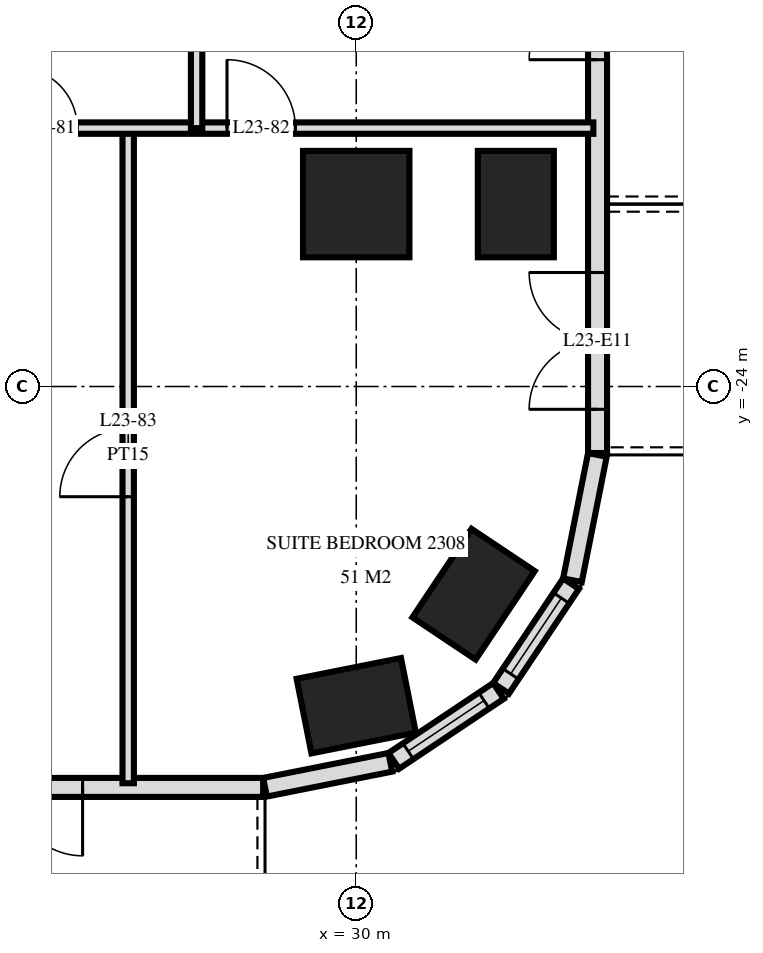
"""IFC4 building model, lengths in metres.
Left out: names, types, materials, properties, quantities, classifications, styles, units other than length and angle.
Written with IfcOpenShell. Run it as: python <this file> out.ifc"""

import sys

from ifc_helpers import new_model, si_unit, direction, frame, frame_2d, origin, origin_2d, place, context, subcontext, project, spatial, rectangle, extrude, element, fill, save


model = new_model("IFC4")
c1 = context("Model", 3, precision=1e-05, world=origin(), true_north=direction((0.0, 1.0)))
c2 = subcontext(c1, "Body", "Model", "MODEL_VIEW")
j1 = project(units=[si_unit("LENGTHUNIT", "METRE"), si_unit("PLANEANGLEUNIT", "RADIAN")], contexts=[c1])
p1 = place(None, origin())
s1 = spatial("IfcSite", under=j1, at=p1, CompositionType="ELEMENT")
p2 = place(p1, origin())
s2 = spatial("IfcBuilding", under=s1, at=p2, CompositionType="ELEMENT")
p3 = place(p2, frame((0.0, 0.0, 92.4)))
s3 = spatial("IfcBuildingStorey", under=s2, at=p3, CompositionType="ELEMENT", Elevation=92.4)
p4 = place(p3, frame((30.0, -28.2, 0.0), z_axis=(0.0, 0.0, 1.0), x_axis=(0.980792089743, 0.195056086032, 0.0)))
e1 = element("IfcColumn", 1, at=p4, inside=s3, PredefinedType="COLUMN", context=c2, shape_type="SweptSolid", body=[
    extrude(rectangle(XDim=1.4, YDim=1.0, at=origin_2d()), origin(), (0.0, 0.0, 1.0), 3.6),
])
p5 = place(p3, frame((30.0, -21.6, 0.0), z_axis=(0.0, 0.0, 1.0), x_axis=(1.0, 0.0, 0.0)))
e2 = element("IfcColumn", 2, at=p5, inside=s3, PredefinedType="COLUMN", context=c2, shape_type="SweptSolid", body=[
    extrude(rectangle(XDim=1.4, YDim=1.4, at=origin_2d()), origin(), (0.0, 0.0, 1.0), 3.6),
])
for number, where, z_axis, x_axis in (
    (3, (31.544, -26.733, 0.0), (0.0, 0.0, 1.0), (0.556, 0.831, 0.0)),
    (4, (32.1, -21.6, 0.0), (0.0, 0.0, 1.0), (0.0, 1.0, 0.0)),
):
    element("IfcColumn", number, at=place(p3, frame(where, z_axis=z_axis, x_axis=x_axis)), inside=s3, PredefinedType="COLUMN", context=c2, shape_type="SweptSolid", body=[
        extrude(rectangle(XDim=1.4, YDim=1.0, at=origin_2d()), origin(), (0.0, 0.0, 1.0), 3.6),
    ])
p6 = place(p3, frame((-28.775, -29.275, 0.0), z_axis=(0.0, 0.0, 1.0), x_axis=(1.0, 0.0, 0.0)))
e5 = element("IfcWall", 5, at=p6, inside=s3, PredefinedType="SOLIDWALL", context=c2, shape_type="SweptSolid", body=[
    extrude(rectangle(XDim=57.551, YDim=0.25, at=frame_2d((28.775, 0.0))), origin(), (0.0, 0.0, 1.0), 3.32),
])
p7 = place(p6, frame((0.575, 0.0, 0.0)))
e6 = element("IfcOpeningElement", 6, at=p7, cuts=e5, PredefinedType="OPENING", context=c2, shape_type="SweptSolid", body=[
    extrude(rectangle(XDim=1.8, YDim=2.4, at=frame_2d((0.9, 1.2))), frame((0.0, 0.135, 0.0), z_axis=(0.0, -1.0, 0.0), x_axis=(1.0, 0.0, 0.0)), (0.0, 0.0, 1.0), 0.27),
])
p8 = place(p6, frame((5.075, 0.0, 0.3)))
e7 = element("IfcOpeningElement", 7, at=p8, cuts=e5, PredefinedType="OPENING", context=c2, shape_type="SweptSolid", body=[
    extrude(rectangle(XDim=2.4, YDim=2.1, at=frame_2d((1.2, 1.05))), frame((0.0, 0.135, 0.0), z_axis=(0.0, -1.0, 0.0), x_axis=(1.0, 0.0, 0.0)), (0.0, 0.0, 1.0), 0.27),
])
p9 = place(p6, frame((8.375, 0.0, 0.0)))
e8 = element("IfcOpeningElement", 8, at=p9, cuts=e5, PredefinedType="OPENING", context=c2, shape_type="SweptSolid", body=[
    extrude(rectangle(XDim=1.8, YDim=2.4, at=frame_2d((0.9, 1.2))), frame((0.0, 0.135, 0.0), z_axis=(0.0, -1.0, 0.0), x_axis=(1.0, 0.0, 0.0)), (0.0, 0.0, 1.0), 0.27),
])
p10 = place(p6, frame((11.375, 0.0, 0.0)))
e9 = element("IfcOpeningElement", 9, at=p10, cuts=e5, PredefinedType="OPENING", context=c2, shape_type="SweptSolid", body=[
    extrude(rectangle(XDim=1.8, YDim=2.4, at=frame_2d((0.9, 1.2))), frame((0.0, 0.135, 0.0), z_axis=(0.0, -1.0, 0.0), x_axis=(1.0, 0.0, 0.0)), (0.0, 0.0, 1.0), 0.27),
])
p11 = place(p6, frame((14.075, 0.0, 0.3)))
e10 = element("IfcOpeningElement", 10, at=p11, cuts=e5, PredefinedType="OPENING", context=c2, shape_type="SweptSolid", body=[
    extrude(rectangle(XDim=2.4, YDim=2.1, at=frame_2d((1.2, 1.05))), frame((0.0, 0.135, 0.0), z_axis=(0.0, -1.0, 0.0), x_axis=(1.0, 0.0, 0.0)), (0.0, 0.0, 1.0), 0.27),
])
p12 = place(p6, frame((17.375, 0.0, 0.0)))
e11 = element("IfcOpeningElement", 11, at=p12, cuts=e5, PredefinedType="OPENING", context=c2, shape_type="SweptSolid", body=[
    extrude(rectangle(XDim=1.8, YDim=2.4, at=frame_2d((0.9, 1.2))), frame((0.0, 0.135, 0.0), z_axis=(0.0, -1.0, 0.0), x_axis=(1.0, 0.0, 0.0)), (0.0, 0.0, 1.0), 0.27),
])
p13 = place(p6, frame((20.075, 0.0, 0.3)))
e12 = element("IfcOpeningElement", 12, at=p13, cuts=e5, PredefinedType="OPENING", context=c2, shape_type="SweptSolid", body=[
    extrude(rectangle(XDim=2.4, YDim=2.1, at=frame_2d((1.2, 1.05))), frame((0.0, 0.135, 0.0), z_axis=(0.0, -1.0, 0.0), x_axis=(1.0, 0.0, 0.0)), (0.0, 0.0, 1.0), 0.27),
])
p14 = place(p6, frame((23.075, 0.0, 0.3)))
e13 = element("IfcOpeningElement", 13, at=p14, cuts=e5, PredefinedType="OPENING", context=c2, shape_type="SweptSolid", body=[
    extrude(rectangle(XDim=2.4, YDim=2.1, at=frame_2d((1.2, 1.05))), frame((0.0, 0.135, 0.0), z_axis=(0.0, -1.0, 0.0), x_axis=(1.0, 0.0, 0.0)), (0.0, 0.0, 1.0), 0.27),
])
p15 = place(p6, frame((26.375, 0.0, 0.0)))
e14 = element("IfcOpeningElement", 14, at=p15, cuts=e5, PredefinedType="OPENING", context=c2, shape_type="SweptSolid", body=[
    extrude(rectangle(XDim=1.8, YDim=2.4, at=frame_2d((0.9, 1.2))), frame((0.0, 0.135, 0.0), z_axis=(0.0, -1.0, 0.0), x_axis=(1.0, 0.0, 0.0)), (0.0, 0.0, 1.0), 0.27),
])
p16 = place(p6, frame((29.375, 0.0, 0.0)))
e15 = element("IfcOpeningElement", 15, at=p16, cuts=e5, PredefinedType="OPENING", context=c2, shape_type="SweptSolid", body=[
    extrude(rectangle(XDim=1.8, YDim=2.4, at=frame_2d((0.9, 1.2))), frame((0.0, 0.135, 0.0), z_axis=(0.0, -1.0, 0.0), x_axis=(1.0, 0.0, 0.0)), (0.0, 0.0, 1.0), 0.27),
])
p17 = place(p6, frame((32.075, 0.0, 0.3)))
e16 = element("IfcOpeningElement", 16, at=p17, cuts=e5, PredefinedType="OPENING", context=c2, shape_type="SweptSolid", body=[
    extrude(rectangle(XDim=2.4, YDim=2.1, at=frame_2d((1.2, 1.05))), frame((0.0, 0.135, 0.0), z_axis=(0.0, -1.0, 0.0), x_axis=(1.0, 0.0, 0.0)), (0.0, 0.0, 1.0), 0.27),
])
p18 = place(p6, frame((35.375, 0.0, 0.0)))
e17 = element("IfcOpeningElement", 17, at=p18, cuts=e5, PredefinedType="OPENING", context=c2, shape_type="SweptSolid", body=[
    extrude(rectangle(XDim=1.8, YDim=2.4, at=frame_2d((0.9, 1.2))), frame((0.0, 0.135, 0.0), z_axis=(0.0, -1.0, 0.0), x_axis=(1.0, 0.0, 0.0)), (0.0, 0.0, 1.0), 0.27),
])
p19 = place(p6, frame((38.075, 0.0, 0.3)))
e18 = element("IfcOpeningElement", 18, at=p19, cuts=e5, PredefinedType="OPENING", context=c2, shape_type="SweptSolid", body=[
    extrude(rectangle(XDim=2.4, YDim=2.1, at=frame_2d((1.2, 1.05))), frame((0.0, 0.135, 0.0), z_axis=(0.0, -1.0, 0.0), x_axis=(1.0, 0.0, 0.0)), (0.0, 0.0, 1.0), 0.27),
])
p20 = place(p6, frame((41.075, 0.0, 0.3)))
e19 = element("IfcOpeningElement", 19, at=p20, cuts=e5, PredefinedType="OPENING", context=c2, shape_type="SweptSolid", body=[
    extrude(rectangle(XDim=2.4, YDim=2.1, at=frame_2d((1.2, 1.05))), frame((0.0, 0.135, 0.0), z_axis=(0.0, -1.0, 0.0), x_axis=(1.0, 0.0, 0.0)), (0.0, 0.0, 1.0), 0.27),
])
p21 = place(p6, frame((44.375, 0.0, 0.0)))
e20 = element("IfcOpeningElement", 20, at=p21, cuts=e5, PredefinedType="OPENING", context=c2, shape_type="SweptSolid", body=[
    extrude(rectangle(XDim=1.8, YDim=2.4, at=frame_2d((0.9, 1.2))), frame((0.0, 0.135, 0.0), z_axis=(0.0, -1.0, 0.0), x_axis=(1.0, 0.0, 0.0)), (0.0, 0.0, 1.0), 0.27),
])
p22 = place(p6, frame((47.075, 0.0, 0.3)))
e21 = element("IfcOpeningElement", 21, at=p22, cuts=e5, PredefinedType="OPENING", context=c2, shape_type="SweptSolid", body=[
    extrude(rectangle(XDim=2.4, YDim=2.1, at=frame_2d((1.2, 1.05))), frame((0.0, 0.135, 0.0), z_axis=(0.0, -1.0, 0.0), x_axis=(1.0, 0.0, 0.0)), (0.0, 0.0, 1.0), 0.27),
])
p23 = place(p6, frame((50.375, 0.0, 0.0)))
e22 = element("IfcOpeningElement", 22, at=p23, cuts=e5, PredefinedType="OPENING", context=c2, shape_type="SweptSolid", body=[
    extrude(rectangle(XDim=1.8, YDim=2.4, at=frame_2d((0.9, 1.2))), frame((0.0, 0.135, 0.0), z_axis=(0.0, -1.0, 0.0), x_axis=(1.0, 0.0, 0.0)), (0.0, 0.0, 1.0), 0.27),
])
p24 = place(p6, frame((53.375, 0.0, 0.0)))
e23 = element("IfcOpeningElement", 23, at=p24, cuts=e5, PredefinedType="OPENING", context=c2, shape_type="SweptSolid", body=[
    extrude(rectangle(XDim=1.8, YDim=2.4, at=frame_2d((0.9, 1.2))), frame((0.0, 0.135, 0.0), z_axis=(0.0, -1.0, 0.0), x_axis=(1.0, 0.0, 0.0)), (0.0, 0.0, 1.0), 0.27),
])
p25 = place(p3, frame((28.8, -29.273, 0.0), z_axis=(0.0, 0.0, 1.0), x_axis=(0.980775640221, 0.19513878023, 0.0)))
e24 = element("IfcWall", 24, at=p25, inside=s3, PredefinedType="SOLIDWALL", context=c2, shape_type="SweptSolid", body=[
    extrude(rectangle(XDim=1.681, YDim=0.25, at=frame_2d((0.841, 0.0))), origin(), (0.0, 0.0, 1.0), 3.32),
])
p26 = place(p3, frame((30.494, -28.926, 0.0), z_axis=(0.0, 0.0, 1.0), x_axis=(0.831482937015, 0.55555029066, 0.0)))
e25 = element("IfcWall", 25, at=p26, inside=s3, PredefinedType="SOLIDWALL", context=c2, shape_type="SweptSolid", body=[
    extrude(rectangle(XDim=1.656, YDim=0.25, at=frame_2d((0.828, 0.0))), origin(), (0.0, 0.0, 1.0), 3.32),
])
p27 = place(p26, frame((0.228, 0.0, 0.9)))
e26 = element("IfcOpeningElement", 26, at=p27, cuts=e25, PredefinedType="OPENING", context=c2, shape_type="SweptSolid", body=[
    extrude(rectangle(XDim=1.2, YDim=1.5, at=frame_2d((0.6, 0.75))), frame((0.0, 0.135, 0.0), z_axis=(0.0, -1.0, 0.0), x_axis=(1.0, 0.0, 0.0)), (0.0, 0.0, 1.0), 0.27),
])
p28 = place(p3, frame((31.906, -27.971, 0.0), z_axis=(0.0, 0.0, 1.0), x_axis=(0.55555029066, 0.831482937015, 0.0)))
e27 = element("IfcWall", 27, at=p28, inside=s3, PredefinedType="SOLIDWALL", context=c2, shape_type="SweptSolid", body=[
    extrude(rectangle(XDim=1.656, YDim=0.25, at=frame_2d((0.828, 0.0))), origin(), (0.0, 0.0, 1.0), 3.32),
])
p29 = place(p28, frame((0.228, 0.0, 0.9)))
e28 = element("IfcOpeningElement", 28, at=p29, cuts=e27, PredefinedType="OPENING", context=c2, shape_type="SweptSolid", body=[
    extrude(rectangle(XDim=1.2, YDim=1.5, at=frame_2d((0.6, 0.75))), frame((0.0, 0.135, 0.0), z_axis=(0.0, -1.0, 0.0), x_axis=(1.0, 0.0, 0.0)), (0.0, 0.0, 1.0), 0.27),
])
p30 = place(p3, frame((32.844, -26.549, 0.0), z_axis=(0.0, 0.0, 1.0), x_axis=(0.195166572128, 0.980770110232, 0.0)))
e29 = element("IfcWall", 29, at=p30, inside=s3, PredefinedType="SOLIDWALL", context=c2, shape_type="SweptSolid", body=[
    extrude(rectangle(XDim=1.681, YDim=0.25, at=frame_2d((0.841, 0.0))), origin(), (0.0, 0.0, 1.0), 3.32),
])
p31 = place(p3, frame((33.175, -24.875, 0.0), z_axis=(0.0, 0.0, 1.0), x_axis=(0.0, 1.0, 0.0)))
e30 = element("IfcWall", 30, at=p31, inside=s3, PredefinedType="SOLIDWALL", context=c2, shape_type="SweptSolid", body=[
    extrude(rectangle(XDim=21.551, YDim=0.25, at=frame_2d((10.775, 0.0))), origin(), (0.0, 0.0, 1.0), 3.32),
])
p32 = place(p31, frame((0.575, 0.0, 0.0)))
e31 = element("IfcOpeningElement", 31, at=p32, cuts=e30, PredefinedType="OPENING", context=c2, shape_type="SweptSolid", body=[
    extrude(rectangle(XDim=1.8, YDim=2.4, at=frame_2d((0.9, 1.2))), frame((0.0, 0.135, 0.0), z_axis=(0.0, -1.0, 0.0), x_axis=(1.0, 0.0, 0.0)), (0.0, 0.0, 1.0), 0.27),
])
p33 = place(p31, frame((5.175, 0.0, 0.0)))
e32 = element("IfcOpeningElement", 32, at=p33, cuts=e30, PredefinedType="OPENING", context=c2, shape_type="SweptSolid", body=[
    extrude(rectangle(XDim=1.8, YDim=2.4, at=frame_2d((0.9, 1.2))), frame((0.0, 0.135, 0.0), z_axis=(0.0, -1.0, 0.0), x_axis=(1.0, 0.0, 0.0)), (0.0, 0.0, 1.0), 0.27),
])
p34 = place(p31, frame((8.275, 0.0, 0.3)))
e33 = element("IfcOpeningElement", 33, at=p34, cuts=e30, PredefinedType="OPENING", context=c2, shape_type="SweptSolid", body=[
    extrude(rectangle(XDim=1.2, YDim=2.1, at=frame_2d((0.6, 1.05))), frame((0.0, 0.135, 0.0), z_axis=(0.0, -1.0, 0.0), x_axis=(1.0, 0.0, 0.0)), (0.0, 0.0, 1.0), 0.27),
])
p35 = place(p31, frame((12.725, 0.0, 0.0)))
e34 = element("IfcOpeningElement", 34, at=p35, cuts=e30, PredefinedType="OPENING", context=c2, shape_type="SweptSolid", body=[
    extrude(rectangle(XDim=1.8, YDim=2.4, at=frame_2d((0.9, 1.2))), frame((0.0, 0.135, 0.0), z_axis=(0.0, -1.0, 0.0), x_axis=(1.0, 0.0, 0.0)), (0.0, 0.0, 1.0), 0.27),
])
p36 = place(p3, frame((27.9, -20.6, 0.0), z_axis=(0.0, 0.0, 1.0), x_axis=(0.0, 1.0, 0.0)))
e35 = element("IfcWall", 35, at=p36, inside=s3, PredefinedType="PARTITIONING", context=c2, shape_type="SweptSolid", body=[
    extrude(rectangle(XDim=3.6, YDim=0.15, at=frame_2d((1.8, 0.0))), origin(), (0.0, 0.0, 1.0), 3.32),
])
p37 = place(p3, frame((27.0, -29.22, 0.0), z_axis=(0.0, 0.0, 1.0), x_axis=(0.0, 1.0, 0.0)))
e36 = element("IfcWall", 36, at=p37, inside=s3, PredefinedType="PARTITIONING", context=c2, shape_type="SweptSolid", body=[
    extrude(rectangle(XDim=8.62, YDim=0.15, at=frame_2d((4.31, 0.0))), origin(), (0.0, 0.0, 1.0), 3.32),
])
p38 = place(p37, frame((3.77, 0.0, 0.0)))
e37 = element("IfcOpeningElement", 37, at=p38, cuts=e36, PredefinedType="OPENING", context=c2, shape_type="SweptSolid", body=[
    extrude(rectangle(XDim=0.9, YDim=2.1, at=frame_2d((0.45, 1.05))), frame((0.0, 0.085, 0.0), z_axis=(0.0, -1.0, 0.0), x_axis=(1.0, 0.0, 0.0)), (0.0, 0.0, 1.0), 0.17),
])
p39 = place(p3, frame((24.9, -20.6, 0.0), z_axis=(0.0, 0.0, 1.0), x_axis=(1.0, 0.0, 0.0)))
e38 = element("IfcWall", 38, at=p39, inside=s3, PredefinedType="PARTITIONING", context=c2, shape_type="SweptSolid", body=[
    extrude(rectangle(XDim=8.22, YDim=0.15, at=frame_2d((4.11, 0.0))), origin(), (0.0, 0.0, 1.0), 3.32),
])
p40 = place(p39, frame((0.63, 0.0, 0.0)))
e39 = element("IfcOpeningElement", 39, at=p40, cuts=e38, PredefinedType="OPENING", context=c2, shape_type="SweptSolid", body=[
    extrude(rectangle(XDim=0.8, YDim=2.1, at=frame_2d((0.4, 1.05))), frame((0.0, 0.085, 0.0), z_axis=(0.0, -1.0, 0.0), x_axis=(1.0, 0.0, 0.0)), (0.0, 0.0, 1.0), 0.17),
])
p41 = place(p39, frame((3.4, 0.0, 0.0)))
e40 = element("IfcOpeningElement", 40, at=p41, cuts=e38, PredefinedType="OPENING", context=c2, shape_type="SweptSolid", body=[
    extrude(rectangle(XDim=0.9, YDim=2.1, at=frame_2d((0.45, 1.05))), frame((0.0, 0.085, 0.0), z_axis=(0.0, -1.0, 0.0), x_axis=(1.0, 0.0, 0.0)), (0.0, 0.0, 1.0), 0.17),
])
p42 = place(p27, origin())
e41 = element("IfcWindow", 41, at=p42, inside=s3, PartitioningType="SINGLE_PANEL", PredefinedType="WINDOW", context=c2, shape_type="SweptSolid", body=[
    extrude(rectangle(XDim=1.2, YDim=1.5, at=frame_2d((0.6, 0.75))), frame((0.0, 0.03, 0.0), z_axis=(0.0, -1.0, 0.0), x_axis=(1.0, 0.0, 0.0)), (0.0, 0.0, 1.0), 0.06),
])
fill(e26, e41)
p43 = place(p29, origin())
e42 = element("IfcWindow", 42, at=p43, inside=s3, PartitioningType="SINGLE_PANEL", PredefinedType="WINDOW", context=c2, shape_type="SweptSolid", body=[
    extrude(rectangle(XDim=1.2, YDim=1.5, at=frame_2d((0.6, 0.75))), frame((0.0, 0.03, 0.0), z_axis=(0.0, -1.0, 0.0), x_axis=(1.0, 0.0, 0.0)), (0.0, 0.0, 1.0), 0.06),
])
fill(e28, e42)
p44 = place(p24, frame((0.9, 0.0, 0.0), z_axis=(0.0, 0.0, 1.0), x_axis=(-1.0, 0.0, 0.0)))
e43 = element("IfcDoor", 43, at=p44, inside=s3, OperationType="DOUBLE_DOOR_SINGLE_SWING", PredefinedType="DOOR", context=c2, shape_type="SweptSolid", body=[
    extrude(rectangle(XDim=1.8, YDim=2.4, at=frame_2d((0.0, 1.2))), frame((0.0, -0.025, 0.0), z_axis=(0.0, 1.0, 0.0), x_axis=(-1.0, 0.0, 0.0)), (0.0, 0.0, 1.0), 0.05),
])
fill(e23, e43)
p45 = place(p32, origin())
e44 = element("IfcDoor", 44, at=p45, inside=s3, OperationType="DOUBLE_DOOR_SINGLE_SWING", PredefinedType="DOOR", context=c2, shape_type="SweptSolid", body=[
    extrude(rectangle(XDim=1.8, YDim=2.4, at=frame_2d((0.9, 1.2))), frame((0.0, 0.025, 0.0), z_axis=(0.0, -1.0, 0.0), x_axis=(1.0, 0.0, 0.0)), (0.0, 0.0, 1.0), 0.05),
])
fill(e31, e44)
p46 = place(p33, origin())
e45 = element("IfcDoor", 45, at=p46, inside=s3, OperationType="DOUBLE_DOOR_SINGLE_SWING", PredefinedType="DOOR", context=c2, shape_type="SweptSolid", body=[
    extrude(rectangle(XDim=1.8, YDim=2.4, at=frame_2d((0.9, 1.2))), frame((0.0, 0.025, 0.0), z_axis=(0.0, -1.0, 0.0), x_axis=(1.0, 0.0, 0.0)), (0.0, 0.0, 1.0), 0.05),
])
fill(e32, e45)
p47 = place(p40, origin())
e46 = element("IfcDoor", 46, at=p47, inside=s3, OperationType="SINGLE_SWING_RIGHT", PredefinedType="DOOR", context=c2, shape_type="SweptSolid", body=[
    extrude(rectangle(XDim=0.8, YDim=2.1, at=frame_2d((0.4, 1.05))), frame((0.0, 0.025, 0.0), z_axis=(0.0, -1.0, 0.0), x_axis=(1.0, 0.0, 0.0)), (0.0, 0.0, 1.0), 0.05),
])
fill(e39, e46)
p48 = place(p41, origin())
e47 = element("IfcDoor", 47, at=p48, inside=s3, OperationType="SINGLE_SWING_RIGHT", PredefinedType="DOOR", context=c2, shape_type="SweptSolid", body=[
    extrude(rectangle(XDim=0.9, YDim=2.1, at=frame_2d((0.45, 1.05))), frame((0.0, 0.025, 0.0), z_axis=(0.0, -1.0, 0.0), x_axis=(1.0, 0.0, 0.0)), (0.0, 0.0, 1.0), 0.05),
])
fill(e40, e47)
p49 = place(p38, origin())
e48 = element("IfcDoor", 48, at=p49, inside=s3, OperationType="SINGLE_SWING_RIGHT", PredefinedType="DOOR", context=c2, shape_type="SweptSolid", body=[
    extrude(rectangle(XDim=0.9, YDim=2.1, at=frame_2d((0.45, 1.05))), frame((0.0, 0.025, 0.0), z_axis=(0.0, -1.0, 0.0), x_axis=(1.0, 0.0, 0.0)), (0.0, 0.0, 1.0), 0.05),
])
fill(e37, e48)
save(model, sys.argv[1])
